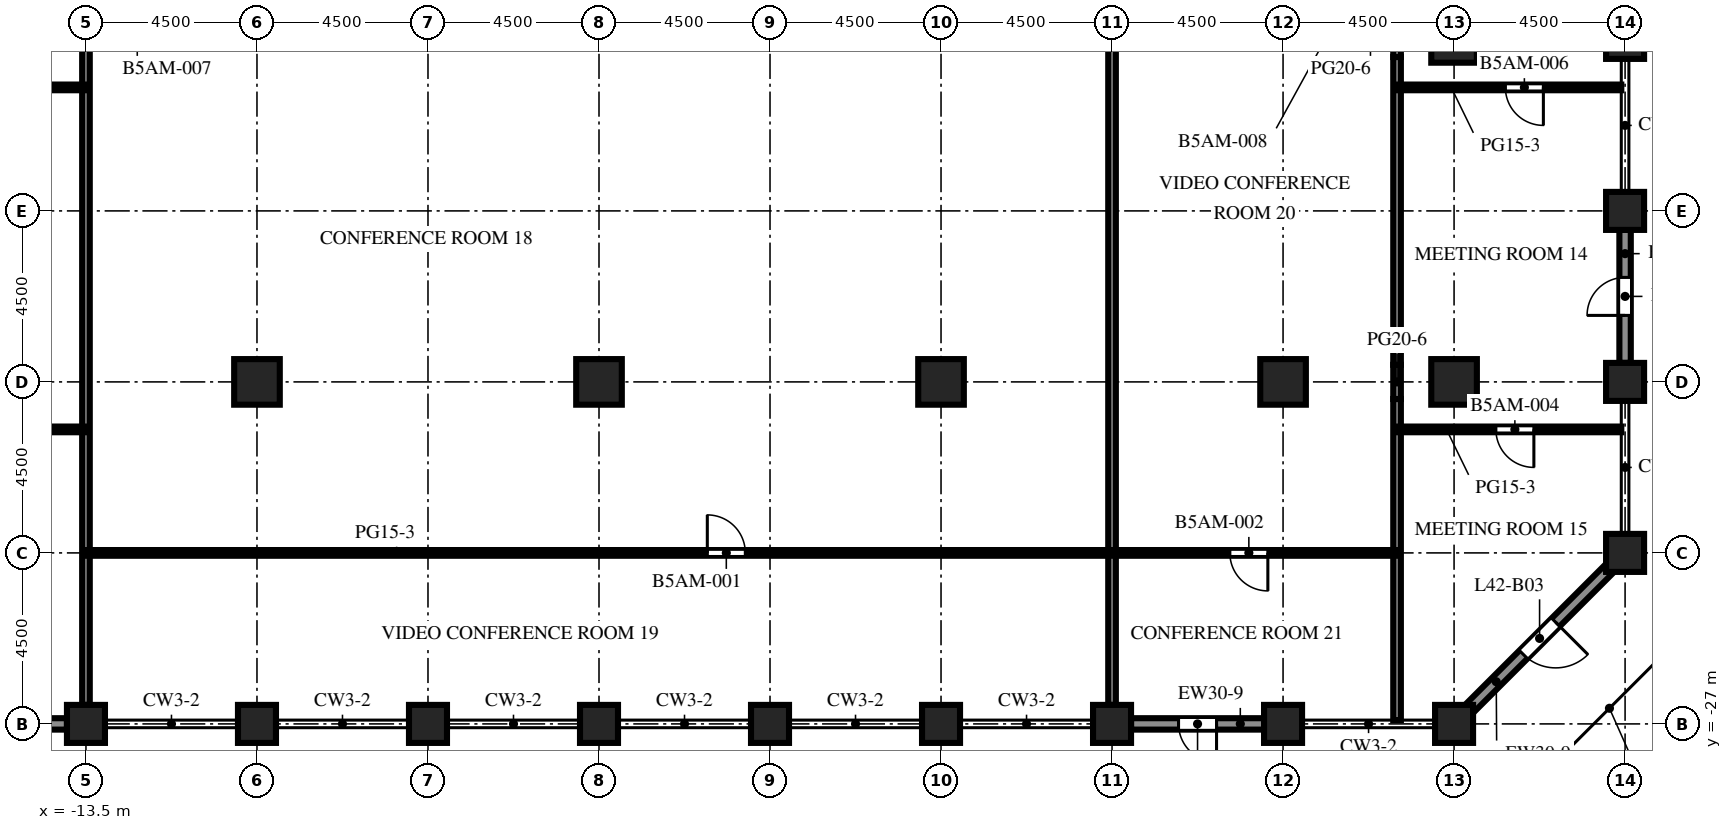
"""IFC4 building model, lengths in metres.
Left out: names, types, materials, properties, quantities, classifications, styles, units other than length and angle.
Written with IfcOpenShell. Run it as: python <this file> out.ifc"""

import sys

from ifc_helpers import new_model, si_unit, direction, frame, frame_2d, origin, origin_2d, place, context, subcontext, project, spatial, rectangle, extrude, element, fill, save


model = new_model("IFC4")
c1 = context("Model", 3, precision=1e-05, world=origin(), true_north=direction((0.0, 1.0)))
c2 = subcontext(c1, "Body", "Model", "MODEL_VIEW")
j1 = project(units=[si_unit("LENGTHUNIT", "METRE"), si_unit("PLANEANGLEUNIT", "RADIAN")], contexts=[c1])
p1 = place(None, origin())
s1 = spatial("IfcSite", under=j1, at=p1, CompositionType="ELEMENT")
p2 = place(p1, origin())
s2 = spatial("IfcBuilding", under=s1, at=p2, CompositionType="ELEMENT")
p3 = place(p2, frame((0.0, 0.0, 185.5)))
s3 = spatial("IfcBuildingStorey", under=s2, at=p3, CompositionType="ELEMENT", Elevation=185.5)
for number, where, z_axis, x_axis in (
    (1, (-13.5, -27.0, 0.0), (0.0, 0.0, 1.0), (1.0, 0.0, 0.0)),
    (2, (-9.0, -27.0, 0.0), (0.0, 0.0, 1.0), (1.0, 0.0, 0.0)),
    (3, (-4.5, -27.0, 0.0), (0.0, 0.0, 1.0), (1.0, 0.0, 0.0)),
    (4, (0.0, -27.0, 0.0), (0.0, 0.0, 1.0), (1.0, 0.0, 0.0)),
    (5, (4.5, -27.0, 0.0), (0.0, 0.0, 1.0), (1.0, 0.0, 0.0)),
    (6, (9.0, -27.0, 0.0), (0.0, 0.0, 1.0), (1.0, 0.0, 0.0)),
    (7, (13.5, -27.0, 0.0), (0.0, 0.0, 1.0), (1.0, 0.0, 0.0)),
    (8, (18.0, -27.0, 0.0), (0.0, 0.0, 1.0), (1.0, 0.0, 0.0)),
    (9, (22.5, -27.0, 0.0), (0.0, 0.0, 1.0), (1.0, 0.0, 0.0)),
    (10, (27.0, -22.5, 0.0), (0.0, 0.0, 1.0), (1.0, 0.0, 0.0)),
):
    element("IfcColumn", number, at=place(p3, frame(where, z_axis=z_axis, x_axis=x_axis)), inside=s3, PredefinedType="COLUMN", context=c2, shape_type="SweptSolid", body=[
        extrude(rectangle(XDim=1.0, YDim=1.0, at=origin_2d()), origin(), (0.0, 0.0, 1.0), 6.0),
    ])
p4 = place(p3, frame((27.0, -18.0, 0.0), z_axis=(0.0, 0.0, 1.0), x_axis=(1.0, 0.0, 0.0)))
e11 = element("IfcColumn", 11, at=p4, inside=s3, PredefinedType="COLUMN", context=c2, shape_type="SweptSolid", body=[
    extrude(rectangle(XDim=1.0, YDim=1.0, at=origin_2d()), origin(), (0.0, 0.0, 1.0), 5.55),
])
p5 = place(p3, frame((27.0, -13.5, 0.0), z_axis=(0.0, 0.0, 1.0), x_axis=(1.0, 0.0, 0.0)))
e12 = element("IfcColumn", 12, at=p5, inside=s3, PredefinedType="COLUMN", context=c2, shape_type="SweptSolid", body=[
    extrude(rectangle(XDim=1.0, YDim=1.0, at=origin_2d()), origin(), (0.0, 0.0, 1.0), 6.0),
])
p6 = place(p3, frame((27.0, -9.0, 0.0), z_axis=(0.0, 0.0, 1.0), x_axis=(1.0, 0.0, 0.0)))
e13 = element("IfcColumn", 13, at=p6, inside=s3, PredefinedType="COLUMN", context=c2, shape_type="SweptSolid", body=[
    extrude(rectangle(XDim=1.0, YDim=1.0, at=origin_2d()), origin(), (0.0, 0.0, 1.0), 5.55),
])
for number, where, z_axis, x_axis in (
    (14, (-9.0, -18.0, 0.0), (0.0, 0.0, 1.0), (1.0, 0.0, 0.0)),
    (15, (0.0, -18.0, 0.0), (0.0, 0.0, 1.0), (1.0, 0.0, 0.0)),
    (16, (9.0, -18.0, 0.0), (0.0, 0.0, 1.0), (1.0, 0.0, 0.0)),
):
    element("IfcColumn", number, at=place(p3, frame(where, z_axis=z_axis, x_axis=x_axis)), inside=s3, PredefinedType="COLUMN", context=c2, shape_type="SweptSolid", body=[
        extrude(rectangle(XDim=1.2, YDim=1.2, at=origin_2d()), origin(), (0.0, 0.0, 1.0), 6.0),
    ])
for number, where, z_axis, x_axis in (
    (17, (18.0, -18.0, 0.0), (0.0, 0.0, 1.0), (1.0, 0.0, 0.0)),
    (18, (22.5, -18.0, 0.0), (0.0, 0.0, 1.0), (1.0, 0.0, 0.0)),
    (19, (22.5, -9.0, 0.0), (0.0, 0.0, 1.0), (1.0, 0.0, 0.0)),
):
    element("IfcColumn", number, at=place(p3, frame(where, z_axis=z_axis, x_axis=x_axis)), inside=s3, PredefinedType="COLUMN", context=c2, shape_type="SweptSolid", body=[
        extrude(rectangle(XDim=1.2, YDim=1.2, at=origin_2d()), origin(), (0.0, 0.0, 1.0), 5.55),
    ])
p7 = place(p3, frame((-14.0, -27.0, 0.0), z_axis=(0.0, 0.0, 1.0), x_axis=(-1.0, 0.0, 0.0)))
e20 = element("IfcWall", 20, at=p7, inside=s3, PredefinedType="SOLIDWALL", context=c2, shape_type="SweptSolid", body=[
    extrude(rectangle(XDim=3.5, YDim=0.3, at=frame_2d((1.75, 0.0))), origin(), (0.0, 0.0, 1.0), 4.75),
])
p8 = place(p7, frame((1.25, 0.0, 0.0)))
e21 = element("IfcOpeningElement", 21, at=p8, cuts=e20, PredefinedType="OPENING", context=c2, shape_type="SweptSolid", body=[
    extrude(rectangle(XDim=1.0, YDim=2.2, at=frame_2d((0.5, 1.1))), frame((0.0, 0.16, 0.0), z_axis=(0.0, -1.0, 0.0), x_axis=(1.0, 0.0, 0.0)), (0.0, 0.0, 1.0), 0.32),
])
p9 = place(p3, frame((17.5, -27.0, 0.0), z_axis=(0.0, 0.0, 1.0), x_axis=(-1.0, 0.0, 0.0)))
e22 = element("IfcWall", 22, at=p9, inside=s3, PredefinedType="SOLIDWALL", context=c2, shape_type="SweptSolid", body=[
    extrude(rectangle(XDim=3.5, YDim=0.3, at=frame_2d((1.75, 0.0))), origin(), (0.0, 0.0, 1.0), 4.75),
])
p10 = place(p9, frame((1.25, 0.0, 0.0)))
e23 = element("IfcOpeningElement", 23, at=p10, cuts=e22, PredefinedType="OPENING", context=c2, shape_type="SweptSolid", body=[
    extrude(rectangle(XDim=1.0, YDim=2.2, at=frame_2d((0.5, 1.1))), frame((0.0, 0.16, 0.0), z_axis=(0.0, -1.0, 0.0), x_axis=(1.0, 0.0, 0.0)), (0.0, 0.0, 1.0), 0.32),
])
p11 = place(p3, frame((26.606, -22.894, 0.0), z_axis=(0.0, 0.0, 1.0), x_axis=(-0.707106781187, -0.707106781187, 0.0)))
e24 = element("IfcWall", 24, at=p11, inside=s3, PredefinedType="SOLIDWALL", context=c2, shape_type="SweptSolid", body=[
    extrude(rectangle(XDim=5.25, YDim=0.3, at=frame_2d((2.625, 0.0))), origin(), (0.0, 0.0, 1.0), 4.75),
])
p12 = place(p11, frame((2.025, 0.0, 0.0)))
e25 = element("IfcOpeningElement", 25, at=p12, cuts=e24, PredefinedType="OPENING", context=c2, shape_type="SweptSolid", body=[
    extrude(rectangle(XDim=1.2, YDim=2.2, at=frame_2d((0.6, 1.1))), frame((0.0, 0.16, 0.0), z_axis=(0.0, -1.0, 0.0), x_axis=(1.0, 0.0, 0.0)), (0.0, 0.0, 1.0), 0.32),
])
p13 = place(p3, frame((27.0, -14.0, 0.0), z_axis=(0.0, 0.0, 1.0), x_axis=(0.0, -1.0, 0.0)))
e26 = element("IfcWall", 26, at=p13, inside=s3, PredefinedType="SOLIDWALL", context=c2, shape_type="SweptSolid", body=[
    extrude(rectangle(XDim=3.5, YDim=0.3, at=frame_2d((1.75, 0.0))), origin(), (0.0, 0.0, 1.0), 3.75),
])
p14 = place(p13, frame((1.25, 0.0, 0.0)))
e27 = element("IfcOpeningElement", 27, at=p14, cuts=e26, PredefinedType="OPENING", context=c2, shape_type="SweptSolid", body=[
    extrude(rectangle(XDim=1.0, YDim=2.2, at=frame_2d((0.5, 1.1))), frame((0.0, 0.16, 0.0), z_axis=(0.0, -1.0, 0.0), x_axis=(1.0, 0.0, 0.0)), (0.0, 0.0, 1.0), 0.32),
])
p15 = place(p3, frame((-13.5, -26.5, 0.0), z_axis=(0.0, 0.0, 1.0), x_axis=(0.0, 1.0, 0.0)))
e28 = element("IfcWall", 28, at=p15, inside=s3, PredefinedType="PARTITIONING", context=c2, shape_type="SweptSolid", body=[
    extrude(rectangle(XDim=29.75, YDim=0.2, at=frame_2d((14.875, 0.0))), origin(), (0.0, 0.0, 1.0), 5.55),
])
p16 = place(p3, frame((13.5, -26.5, 0.0), z_axis=(0.0, 0.0, 1.0), x_axis=(0.0, 1.0, 0.0)))
e29 = element("IfcWall", 29, at=p16, inside=s3, PredefinedType="PARTITIONING", context=c2, shape_type="SweptSolid", body=[
    extrude(rectangle(XDim=17.5, YDim=0.2, at=frame_2d((8.75, 0.0))), origin(), (0.0, 0.0, 1.0), 5.55),
])
p17 = place(p3, frame((21.0, -26.9, 0.0), z_axis=(0.0, 0.0, 1.0), x_axis=(0.0, 1.0, 0.0)))
e30 = element("IfcWall", 30, at=p17, inside=s3, PredefinedType="PARTITIONING", context=c2, shape_type="SweptSolid", body=[
    extrude(rectangle(XDim=8.45, YDim=0.2, at=frame_2d((4.225, 0.0))), origin(), (0.0, 0.0, 1.0), 5.55),
])
p18 = place(p3, frame((21.0, -18.45, 0.0), z_axis=(0.0, 0.0, 1.0), x_axis=(0.0, 1.0, 0.0)))
e31 = element("IfcWall", 31, at=p18, inside=s3, PredefinedType="PARTITIONING", context=c2, shape_type="SweptSolid", body=[
    extrude(rectangle(XDim=0.9, YDim=0.2, at=frame_2d((0.45, 0.0))), origin(), (0.0, 0.0, 1.0), 3.72),
])
p19 = place(p3, frame((21.0, -17.55, 0.0), z_axis=(0.0, 0.0, 1.0), x_axis=(0.0, 1.0, 0.0)))
e32 = element("IfcWall", 32, at=p19, inside=s3, PredefinedType="PARTITIONING", context=c2, shape_type="SweptSolid", body=[
    extrude(rectangle(XDim=8.1, YDim=0.2, at=frame_2d((4.05, 0.0))), origin(), (0.0, 0.0, 1.0), 5.55),
])
p20 = place(p3, frame((21.0, -9.45, 0.0), z_axis=(0.0, 0.0, 1.0), x_axis=(0.0, 1.0, 0.0)))
e33 = element("IfcWall", 33, at=p20, inside=s3, PredefinedType="PARTITIONING", context=c2, shape_type="SweptSolid", body=[
    extrude(rectangle(XDim=0.9, YDim=0.2, at=frame_2d((0.45, 0.0))), origin(), (0.0, 0.0, 1.0), 3.72),
])
p21 = place(p3, frame((21.0, -22.5, 0.0), z_axis=(0.0, 0.0, 1.0), x_axis=(-1.0, 0.0, 0.0)))
e34 = element("IfcWall", 34, at=p21, inside=s3, PredefinedType="PARTITIONING", context=c2, shape_type="SweptSolid", body=[
    extrude(rectangle(XDim=34.5, YDim=0.15, at=frame_2d((17.25, 0.0))), origin(), (0.0, 0.0, 1.0), 5.55),
])
p22 = place(p21, frame((17.15, 0.0, 0.0)))
e35 = element("IfcOpeningElement", 35, at=p22, cuts=e34, PredefinedType="OPENING", context=c2, shape_type="SweptSolid", body=[
    extrude(rectangle(XDim=1.0, YDim=2.1, at=frame_2d((0.5, 1.05))), frame((0.0, 0.085, 0.0), z_axis=(0.0, -1.0, 0.0), x_axis=(1.0, 0.0, 0.0)), (0.0, 0.0, 1.0), 0.17),
])
p23 = place(p21, frame((3.4, 0.0, 0.0)))
e36 = element("IfcOpeningElement", 36, at=p23, cuts=e34, PredefinedType="OPENING", context=c2, shape_type="SweptSolid", body=[
    extrude(rectangle(XDim=1.0, YDim=2.1, at=frame_2d((0.5, 1.05))), frame((0.0, 0.085, 0.0), z_axis=(0.0, -1.0, 0.0), x_axis=(1.0, 0.0, 0.0)), (0.0, 0.0, 1.0), 0.17),
])
p24 = place(p3, frame((-13.5, -19.25, 0.0), z_axis=(0.0, 0.0, 1.0), x_axis=(-1.0, 0.0, 0.0)))
e37 = element("IfcWall", 37, at=p24, inside=s3, PredefinedType="PARTITIONING", context=c2, shape_type="SweptSolid", body=[
    extrude(rectangle(XDim=8.55, YDim=0.15, at=frame_2d((4.275, 0.0))), origin(), (0.0, 0.0, 1.0), 5.55),
])
p25 = place(p24, frame((6.9, 0.0, 0.0)))
e38 = element("IfcOpeningElement", 38, at=p25, cuts=e37, PredefinedType="OPENING", context=c2, shape_type="SweptSolid", body=[
    extrude(rectangle(XDim=1.0, YDim=2.1, at=frame_2d((0.5, 1.05))), frame((0.0, 0.085, 0.0), z_axis=(0.0, -1.0, 0.0), x_axis=(1.0, 0.0, 0.0)), (0.0, 0.0, 1.0), 0.17),
])
p26 = place(p3, frame((26.9, -19.25, 0.0), z_axis=(0.0, 0.0, 1.0), x_axis=(-1.0, 0.0, 0.0)))
e39 = element("IfcWall", 39, at=p26, inside=s3, PredefinedType="PARTITIONING", context=c2, shape_type="SweptSolid", body=[
    extrude(rectangle(XDim=5.9, YDim=0.15, at=frame_2d((2.95, 0.0))), origin(), (0.0, 0.0, 1.0), 5.55),
])
p27 = place(p26, frame((2.3, 0.0, 0.0)))
e40 = element("IfcOpeningElement", 40, at=p27, cuts=e39, PredefinedType="OPENING", context=c2, shape_type="SweptSolid", body=[
    extrude(rectangle(XDim=1.0, YDim=2.1, at=frame_2d((0.5, 1.05))), frame((0.0, 0.085, 0.0), z_axis=(0.0, -1.0, 0.0), x_axis=(1.0, 0.0, 0.0)), (0.0, 0.0, 1.0), 0.17),
])
p28 = place(p3, frame((-13.5, -10.25, 0.0), z_axis=(0.0, 0.0, 1.0), x_axis=(-1.0, 0.0, 0.0)))
e41 = element("IfcWall", 41, at=p28, inside=s3, PredefinedType="PARTITIONING", context=c2, shape_type="SweptSolid", body=[
    extrude(rectangle(XDim=8.55, YDim=0.15, at=frame_2d((4.275, 0.0))), origin(), (0.0, 0.0, 1.0), 5.55),
])
p29 = place(p28, frame((6.4, 0.0, 0.0)))
e42 = element("IfcOpeningElement", 42, at=p29, cuts=e41, PredefinedType="OPENING", context=c2, shape_type="SweptSolid", body=[
    extrude(rectangle(XDim=1.0, YDim=2.1, at=frame_2d((0.5, 1.05))), frame((0.0, 0.085, 0.0), z_axis=(0.0, -1.0, 0.0), x_axis=(1.0, 0.0, 0.0)), (0.0, 0.0, 1.0), 0.17),
])
p30 = place(p3, frame((26.9, -10.25, 0.0), z_axis=(0.0, 0.0, 1.0), x_axis=(-1.0, 0.0, 0.0)))
e43 = element("IfcWall", 43, at=p30, inside=s3, PredefinedType="PARTITIONING", context=c2, shape_type="SweptSolid", body=[
    extrude(rectangle(XDim=5.9, YDim=0.15, at=frame_2d((2.95, 0.0))), origin(), (0.0, 0.0, 1.0), 5.55),
])
p31 = place(p30, frame((2.05, 0.0, 0.0)))
e44 = element("IfcOpeningElement", 44, at=p31, cuts=e43, PredefinedType="OPENING", context=c2, shape_type="SweptSolid", body=[
    extrude(rectangle(XDim=1.0, YDim=2.1, at=frame_2d((0.5, 1.05))), frame((0.0, 0.085, 0.0), z_axis=(0.0, -1.0, 0.0), x_axis=(1.0, 0.0, 0.0)), (0.0, 0.0, 1.0), 0.17),
])
p32 = place(p10, origin())
e45 = element("IfcDoor", 45, at=p32, inside=s3, OperationType="SINGLE_SWING_LEFT", PredefinedType="DOOR", context=c2, shape_type="SweptSolid", body=[
    extrude(rectangle(XDim=1.0, YDim=2.2, at=frame_2d((0.5, 1.1))), frame((0.0, 0.025, 0.0), z_axis=(0.0, -1.0, 0.0), x_axis=(1.0, 0.0, 0.0)), (0.0, 0.0, 1.0), 0.05),
])
fill(e23, e45)
p33 = place(p12, origin())
e46 = element("IfcDoor", 46, at=p33, inside=s3, OperationType="SINGLE_SWING_LEFT", PredefinedType="DOOR", context=c2, shape_type="SweptSolid", body=[
    extrude(rectangle(XDim=1.2, YDim=2.2, at=frame_2d((0.6, 1.1))), frame((0.0, 0.025, 0.0), z_axis=(0.0, -1.0, 0.0), x_axis=(1.0, 0.0, 0.0)), (0.0, 0.0, 1.0), 0.05),
])
fill(e25, e46)
p34 = place(p14, origin())
e47 = element("IfcDoor", 47, at=p34, inside=s3, OperationType="SINGLE_SWING_RIGHT", PredefinedType="DOOR", context=c2, shape_type="SweptSolid", body=[
    extrude(rectangle(XDim=1.0, YDim=2.2, at=frame_2d((0.5, 1.1))), frame((0.0, 0.025, 0.0), z_axis=(0.0, -1.0, 0.0), x_axis=(1.0, 0.0, 0.0)), (0.0, 0.0, 1.0), 0.05),
])
fill(e27, e47)
p35 = place(p22, origin())
e48 = element("IfcDoor", 48, at=p35, inside=s3, OperationType="SINGLE_SWING_RIGHT", PredefinedType="DOOR", context=c2, shape_type="SweptSolid", body=[
    extrude(rectangle(XDim=1.0, YDim=2.1, at=frame_2d((0.5, 1.05))), frame((0.0, 0.025, 0.0), z_axis=(0.0, -1.0, 0.0), x_axis=(1.0, 0.0, 0.0)), (0.0, 0.0, 1.0), 0.05),
])
fill(e35, e48)
p36 = place(p23, origin())
e49 = element("IfcDoor", 49, at=p36, inside=s3, OperationType="SINGLE_SWING_LEFT", PredefinedType="DOOR", context=c2, shape_type="SweptSolid", body=[
    extrude(rectangle(XDim=1.0, YDim=2.1, at=frame_2d((0.5, 1.05))), frame((0.0, 0.025, 0.0), z_axis=(0.0, -1.0, 0.0), x_axis=(1.0, 0.0, 0.0)), (0.0, 0.0, 1.0), 0.05),
])
fill(e36, e49)
p37 = place(p27, origin())
e50 = element("IfcDoor", 50, at=p37, inside=s3, OperationType="SINGLE_SWING_LEFT", PredefinedType="DOOR", context=c2, shape_type="SweptSolid", body=[
    extrude(rectangle(XDim=1.0, YDim=2.1, at=frame_2d((0.5, 1.05))), frame((0.0, 0.025, 0.0), z_axis=(0.0, -1.0, 0.0), x_axis=(1.0, 0.0, 0.0)), (0.0, 0.0, 1.0), 0.05),
])
fill(e40, e50)
p38 = place(p31, origin())
e51 = element("IfcDoor", 51, at=p38, inside=s3, OperationType="SINGLE_SWING_LEFT", PredefinedType="DOOR", context=c2, shape_type="SweptSolid", body=[
    extrude(rectangle(XDim=1.0, YDim=2.1, at=frame_2d((0.5, 1.05))), frame((0.0, 0.025, 0.0), z_axis=(0.0, -1.0, 0.0), x_axis=(1.0, 0.0, 0.0)), (0.0, 0.0, 1.0), 0.05),
])
fill(e44, e51)
save(model, sys.argv[1])
